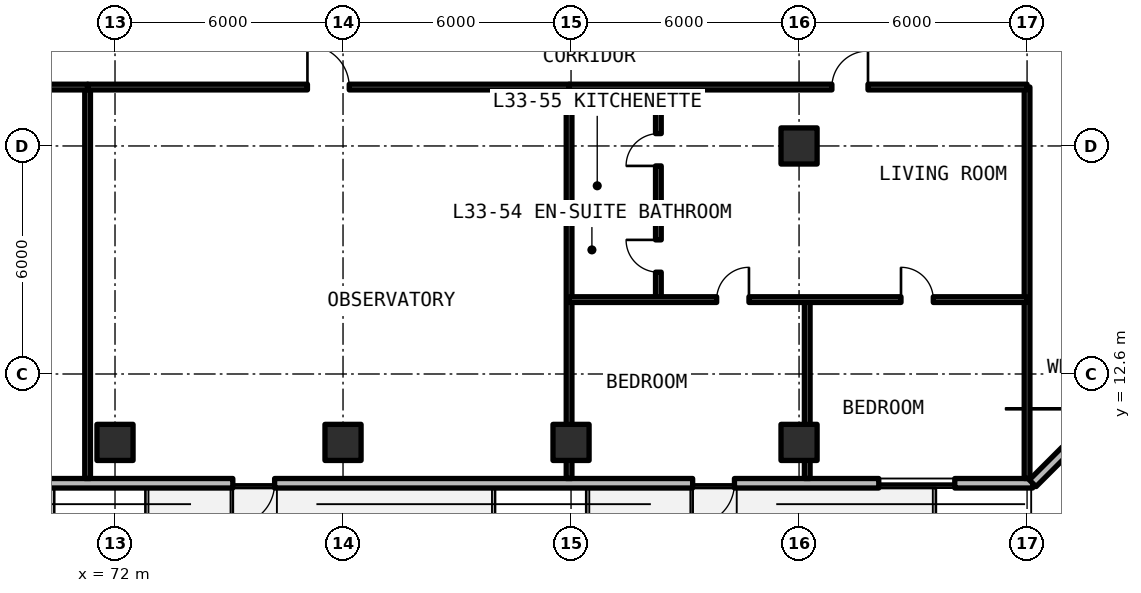
"""IFC4 building model, lengths in metres.
Left out: names, types, materials, properties, quantities, classifications, styles, units other than length and angle.
Written with IfcOpenShell. Run it as: python <this file> out.ifc"""

import sys

from ifc_helpers import new_model, si_unit, direction, frame, frame_2d, origin, origin_2d, place, context, subcontext, project, spatial, rectangle, extrude, element, fill, save


model = new_model("IFC4")
c1 = context("Model", 3, precision=1e-05, world=origin(), true_north=direction((0.0, 1.0)))
c2 = subcontext(c1, "Body", "Model", "MODEL_VIEW")
j1 = project(units=[si_unit("LENGTHUNIT", "METRE"), si_unit("PLANEANGLEUNIT", "RADIAN")], contexts=[c1])
p1 = place(None, origin())
s1 = spatial("IfcSite", under=j1, at=p1, CompositionType="ELEMENT")
p2 = place(p1, origin())
s2 = spatial("IfcBuilding", under=s1, at=p2, CompositionType="ELEMENT")
p3 = place(p2, frame((0.0, 0.0, 119.46)))
s3 = spatial("IfcBuildingStorey", under=s2, at=p3, CompositionType="ELEMENT", Elevation=119.46)
for number, where, z_axis, x_axis in (
    (1, (90.0, 18.6, 0.0), (0.0, 0.0, 1.0), (1.0, 0.0, 0.0)),
    (2, (72.0, 10.8, 0.0), (0.0, 0.0, 1.0), (1.0, 0.0, 0.0)),
    (3, (78.0, 10.8, 0.0), (0.0, 0.0, 1.0), (1.0, 0.0, 0.0)),
    (4, (84.0, 10.8, 0.0), (0.0, 0.0, 1.0), (1.0, 0.0, 0.0)),
    (5, (90.0, 10.8, 0.0), (0.0, 0.0, 1.0), (1.0, 0.0, 0.0)),
):
    element("IfcColumn", number, at=place(p3, frame(where, z_axis=z_axis, x_axis=x_axis)), inside=s3, PredefinedType="COLUMN", context=c2, shape_type="SweptSolid", body=[
        extrude(rectangle(XDim=0.95, YDim=0.95, at=origin_2d()), origin(), (0.0, 0.0, 1.0), 3.63),
    ])
p4 = place(p3, frame((52.125, 9.725, 0.0), z_axis=(0.0, 0.0, 1.0), x_axis=(1.0, 0.0, 0.0)))
e6 = element("IfcWall", 6, at=p4, inside=s3, PredefinedType="SOLIDWALL", context=c2, shape_type="SweptSolid", body=[
    extrude(rectangle(XDim=44.023, YDim=0.25, at=frame_2d((22.012, 0.0))), origin(), (0.0, 0.0, 1.0), 3.35),
])
p5 = place(p4, frame((10.875, 0.0, 0.0)))
e7 = element("IfcOpeningElement", 7, at=p5, cuts=e6, PredefinedType="OPENING", context=c2, shape_type="SweptSolid", body=[
    extrude(rectangle(XDim=1.1, YDim=2.15, at=frame_2d((0.55, 1.075))), frame((0.0, 0.135, 0.0), z_axis=(0.0, -1.0, 0.0), x_axis=(1.0, 0.0, 0.0)), (0.0, 0.0, 1.0), 0.27),
])
p6 = place(p4, frame((22.975, 0.0, 0.0)))
e8 = element("IfcOpeningElement", 8, at=p6, cuts=e6, PredefinedType="OPENING", context=c2, shape_type="SweptSolid", body=[
    extrude(rectangle(XDim=1.1, YDim=2.15, at=frame_2d((0.55, 1.075))), frame((0.0, 0.135, 0.0), z_axis=(0.0, -1.0, 0.0), x_axis=(1.0, 0.0, 0.0)), (0.0, 0.0, 1.0), 0.27),
])
p7 = place(p4, frame((35.075, 0.0, 0.0)))
e9 = element("IfcOpeningElement", 9, at=p7, cuts=e6, PredefinedType="OPENING", context=c2, shape_type="SweptSolid", body=[
    extrude(rectangle(XDim=1.1, YDim=2.15, at=frame_2d((0.55, 1.075))), frame((0.0, 0.135, 0.0), z_axis=(0.0, -1.0, 0.0), x_axis=(1.0, 0.0, 0.0)), (0.0, 0.0, 1.0), 0.27),
])
p8 = place(p4, frame((2.703, 0.0, 0.78)))
e10 = element("IfcOpeningElement", 10, at=p8, cuts=e6, PredefinedType="OPENING", context=c2, shape_type="SweptSolid", body=[
    extrude(rectangle(XDim=2.0, YDim=1.66, at=frame_2d((1.0, 0.83))), frame((0.0, 0.135, 0.0), z_axis=(0.0, -1.0, 0.0), x_axis=(1.0, 0.0, 0.0)), (0.0, 0.0, 1.0), 0.27),
])
p9 = place(p4, frame((39.973, 0.0, 0.78)))
e11 = element("IfcOpeningElement", 11, at=p9, cuts=e6, PredefinedType="OPENING", context=c2, shape_type="SweptSolid", body=[
    extrude(rectangle(XDim=2.0, YDim=1.66, at=frame_2d((1.0, 0.83))), frame((0.0, 0.135, 0.0), z_axis=(0.0, -1.0, 0.0), x_axis=(1.0, 0.0, 0.0)), (0.0, 0.0, 1.0), 0.27),
])
p10 = place(p3, frame((96.148, 9.725, 0.0), z_axis=(0.0, 0.0, 1.0), x_axis=(0.707106781187, 0.707106781187, 0.0)))
e12 = element("IfcWall", 12, at=p10, inside=s3, PredefinedType="SOLIDWALL", context=c2, shape_type="SweptSolid", body=[
    extrude(rectangle(XDim=5.836, YDim=0.25, at=frame_2d((2.918, 0.0))), origin(), (0.0, 0.0, 1.0), 3.35),
])
p11 = place(p10, frame((1.218, 0.0, 0.78)))
e13 = element("IfcOpeningElement", 13, at=p11, cuts=e12, PredefinedType="OPENING", context=c2, shape_type="SweptSolid", body=[
    extrude(rectangle(XDim=3.4, YDim=1.66, at=frame_2d((1.7, 0.83))), frame((0.0, 0.135, 0.0), z_axis=(0.0, -1.0, 0.0), x_axis=(1.0, 0.0, 0.0)), (0.0, 0.0, 1.0), 0.27),
])
for number, where, z_axis, x_axis in (
    (14, (96.0, 9.85, 0.0), (0.0, 0.0, 1.0), (0.0, 1.0, 0.0)),
    (15, (71.279, 9.85, 0.0), (0.0, 0.0, 1.0), (0.0, 1.0, 0.0)),
):
    element("IfcWall", number, at=place(p3, frame(where, z_axis=z_axis, x_axis=x_axis)), inside=s3, PredefinedType="SOLIDWALL", context=c2, shape_type="SweptSolid", body=[
        extrude(rectangle(XDim=10.3, YDim=0.15, at=frame_2d((5.15, 0.0))), origin(), (0.0, 0.0, 1.0), 2.57),
    ])
p12 = place(p3, frame((59.536, 20.15, 0.0), z_axis=(0.0, 0.0, 1.0), x_axis=(1.0, 0.0, 0.0)))
e16 = element("IfcWall", 16, at=p12, inside=s3, PredefinedType="SOLIDWALL", context=c2, shape_type="SweptSolid", body=[
    extrude(rectangle(XDim=11.742, YDim=0.15, at=frame_2d((5.871, 0.0))), origin(), (0.0, 0.0, 1.0), 2.57),
])
p13 = place(p12, frame((5.321, 0.0, 0.0)))
e17 = element("IfcOpeningElement", 17, at=p13, cuts=e16, PredefinedType="OPENING", context=c2, shape_type="SweptSolid", body=[
    extrude(rectangle(XDim=1.1, YDim=2.15, at=frame_2d((0.55, 1.075))), frame((0.0, 0.085, 0.0), z_axis=(0.0, -1.0, 0.0), x_axis=(1.0, 0.0, 0.0)), (0.0, 0.0, 1.0), 0.17),
])
p14 = place(p3, frame((83.948, 9.85, 0.0), z_axis=(0.0, 0.0, 1.0), x_axis=(0.0, 1.0, 0.0)))
e18 = element("IfcWall", 18, at=p14, inside=s3, PredefinedType="SOLIDWALL", context=c2, shape_type="SweptSolid", body=[
    extrude(rectangle(XDim=10.3, YDim=0.15, at=frame_2d((5.15, 0.0))), origin(), (0.0, 0.0, 1.0), 2.57),
])
p15 = place(p3, frame((71.279, 20.15, 0.0), z_axis=(0.0, 0.0, 1.0), x_axis=(1.0, 0.0, 0.0)))
e19 = element("IfcWall", 19, at=p15, inside=s3, PredefinedType="SOLIDWALL", context=c2, shape_type="SweptSolid", body=[
    extrude(rectangle(XDim=12.67, YDim=0.15, at=frame_2d((6.335, 0.0))), origin(), (0.0, 0.0, 1.0), 2.57),
])
p16 = place(p15, frame((5.785, 0.0, 0.0)))
e20 = element("IfcOpeningElement", 20, at=p16, cuts=e19, PredefinedType="OPENING", context=c2, shape_type="SweptSolid", body=[
    extrude(rectangle(XDim=1.1, YDim=2.15, at=frame_2d((0.55, 1.075))), frame((0.0, 0.085, 0.0), z_axis=(0.0, -1.0, 0.0), x_axis=(1.0, 0.0, 0.0)), (0.0, 0.0, 1.0), 0.17),
])
p17 = place(p3, frame((83.948, 16.85, 0.0), z_axis=(0.0, 0.0, 1.0), x_axis=(1.0, 0.0, 0.0)))
e21 = element("IfcWall", 21, at=p17, inside=s3, PredefinedType="PARTITIONING", context=c2, shape_type="SweptSolid", body=[
    extrude(rectangle(XDim=2.35, YDim=0.15, at=frame_2d((1.175, 0.0))), origin(), (0.0, 0.0, 1.0), 2.57),
])
p18 = place(p3, frame((86.298, 14.557, 0.0), z_axis=(0.0, 0.0, 1.0), x_axis=(0.0, 1.0, 0.0)))
e22 = element("IfcWall", 22, at=p18, inside=s3, PredefinedType="PARTITIONING", context=c2, shape_type="SweptSolid", body=[
    extrude(rectangle(XDim=5.593, YDim=0.15, at=frame_2d((2.796, 0.0))), origin(), (0.0, 0.0, 1.0), 2.57),
])
p19 = place(p18, frame((0.721, 0.0, 0.0)))
e23 = element("IfcOpeningElement", 23, at=p19, cuts=e22, PredefinedType="OPENING", context=c2, shape_type="SweptSolid", body=[
    extrude(rectangle(XDim=0.85, YDim=2.1, at=frame_2d((0.425, 1.05))), frame((0.0, 0.085, 0.0), z_axis=(0.0, -1.0, 0.0), x_axis=(1.0, 0.0, 0.0)), (0.0, 0.0, 1.0), 0.17),
])
p20 = place(p18, frame((3.518, 0.0, 0.0)))
e24 = element("IfcOpeningElement", 24, at=p20, cuts=e22, PredefinedType="OPENING", context=c2, shape_type="SweptSolid", body=[
    extrude(rectangle(XDim=0.85, YDim=2.1, at=frame_2d((0.425, 1.05))), frame((0.0, 0.085, 0.0), z_axis=(0.0, -1.0, 0.0), x_axis=(1.0, 0.0, 0.0)), (0.0, 0.0, 1.0), 0.17),
])
p21 = place(p3, frame((90.215, 9.85, 0.0), z_axis=(0.0, 0.0, 1.0), x_axis=(0.0, 1.0, 0.0)))
e25 = element("IfcWall", 25, at=p21, inside=s3, PredefinedType="PARTITIONING", context=c2, shape_type="SweptSolid", body=[
    extrude(rectangle(XDim=4.707, YDim=0.15, at=frame_2d((2.354, 0.0))), origin(), (0.0, 0.0, 1.0), 2.57),
])
p22 = place(p3, frame((83.948, 14.557, 0.0), z_axis=(0.0, 0.0, 1.0), x_axis=(1.0, 0.0, 0.0)))
e26 = element("IfcWall", 26, at=p22, inside=s3, PredefinedType="PARTITIONING", context=c2, shape_type="SweptSolid", body=[
    extrude(rectangle(XDim=12.052, YDim=0.15, at=frame_2d((6.026, 0.0))), origin(), (0.0, 0.0, 1.0), 2.57),
])
p23 = place(p22, frame((3.883, 0.0, 0.0)))
e27 = element("IfcOpeningElement", 27, at=p23, cuts=e26, PredefinedType="OPENING", context=c2, shape_type="SweptSolid", body=[
    extrude(rectangle(XDim=0.85, YDim=2.1, at=frame_2d((0.425, 1.05))), frame((0.0, 0.085, 0.0), z_axis=(0.0, -1.0, 0.0), x_axis=(1.0, 0.0, 0.0)), (0.0, 0.0, 1.0), 0.17),
])
p24 = place(p22, frame((8.734, 0.0, 0.0)))
e28 = element("IfcOpeningElement", 28, at=p24, cuts=e26, PredefinedType="OPENING", context=c2, shape_type="SweptSolid", body=[
    extrude(rectangle(XDim=0.85, YDim=2.1, at=frame_2d((0.425, 1.05))), frame((0.0, 0.085, 0.0), z_axis=(0.0, -1.0, 0.0), x_axis=(1.0, 0.0, 0.0)), (0.0, 0.0, 1.0), 0.17),
])
p25 = place(p3, frame((83.948, 20.15, 0.0), z_axis=(0.0, 0.0, 1.0), x_axis=(1.0, 0.0, 0.0)))
e29 = element("IfcWall", 29, at=p25, inside=s3, PredefinedType="SOLIDWALL", context=c2, shape_type="SweptSolid", body=[
    extrude(rectangle(XDim=12.052, YDim=0.15, at=frame_2d((6.026, 0.0))), origin(), (0.0, 0.0, 1.0), 2.57),
])
p26 = place(p25, frame((6.916, 0.0, 0.0)))
e30 = element("IfcOpeningElement", 30, at=p26, cuts=e29, PredefinedType="OPENING", context=c2, shape_type="SweptSolid", body=[
    extrude(rectangle(XDim=0.95, YDim=2.15, at=frame_2d((0.475, 1.075))), frame((0.0, 0.085, 0.0), z_axis=(0.0, -1.0, 0.0), x_axis=(1.0, 0.0, 0.0)), (0.0, 0.0, 1.0), 0.17),
])
p27 = place(p6, frame((1.1, 0.0, 0.0), z_axis=(0.0, 0.0, 1.0), x_axis=(-1.0, 0.0, 0.0)))
e31 = element("IfcDoor", 31, at=p27, inside=s3, OperationType="SINGLE_SWING_RIGHT", PredefinedType="DOOR", context=c2, shape_type="SweptSolid", body=[
    extrude(rectangle(XDim=1.1, YDim=2.15, at=frame_2d((0.55, 1.075))), frame((0.0, 0.025, 0.0), z_axis=(0.0, -1.0, 0.0), x_axis=(1.0, 0.0, 0.0)), (0.0, 0.0, 1.0), 0.05),
])
fill(e8, e31)
p28 = place(p7, frame((1.1, 0.0, 0.0), z_axis=(0.0, 0.0, 1.0), x_axis=(-1.0, 0.0, 0.0)))
e32 = element("IfcDoor", 32, at=p28, inside=s3, OperationType="SINGLE_SWING_LEFT", PredefinedType="DOOR", context=c2, shape_type="SweptSolid", body=[
    extrude(rectangle(XDim=1.1, YDim=2.15, at=frame_2d((0.55, 1.075))), frame((0.0, 0.025, 0.0), z_axis=(0.0, -1.0, 0.0), x_axis=(1.0, 0.0, 0.0)), (0.0, 0.0, 1.0), 0.05),
])
fill(e9, e32)
p29 = place(p9, origin())
e33 = element("IfcWindow", 33, at=p29, inside=s3, PartitioningType="SINGLE_PANEL", PredefinedType="WINDOW", context=c2, shape_type="SweptSolid", body=[
    extrude(rectangle(XDim=2.0, YDim=1.66, at=frame_2d((1.0, 0.83))), frame((0.0, 0.03, 0.0), z_axis=(0.0, -1.0, 0.0), x_axis=(1.0, 0.0, 0.0)), (0.0, 0.0, 1.0), 0.06),
])
fill(e11, e33)
p30 = place(p16, origin())
e34 = element("IfcDoor", 34, at=p30, inside=s3, OperationType="SINGLE_SWING_LEFT", PredefinedType="DOOR", context=c2, shape_type="SweptSolid", body=[
    extrude(rectangle(XDim=1.1, YDim=2.15, at=frame_2d((0.55, 1.075))), frame((0.0, 0.025, 0.0), z_axis=(0.0, -1.0, 0.0), x_axis=(1.0, 0.0, 0.0)), (0.0, 0.0, 1.0), 0.05),
])
fill(e20, e34)
p31 = place(p19, origin())
e35 = element("IfcDoor", 35, at=p31, inside=s3, OperationType="SINGLE_SWING_RIGHT", PredefinedType="DOOR", context=c2, shape_type="SweptSolid", body=[
    extrude(rectangle(XDim=0.85, YDim=2.1, at=frame_2d((0.425, 1.05))), frame((0.0, 0.025, 0.0), z_axis=(0.0, -1.0, 0.0), x_axis=(1.0, 0.0, 0.0)), (0.0, 0.0, 1.0), 0.05),
])
fill(e23, e35)
p32 = place(p20, origin())
e36 = element("IfcDoor", 36, at=p32, inside=s3, OperationType="SINGLE_SWING_LEFT", PredefinedType="DOOR", context=c2, shape_type="SweptSolid", body=[
    extrude(rectangle(XDim=0.85, YDim=2.1, at=frame_2d((0.425, 1.05))), frame((0.0, 0.025, 0.0), z_axis=(0.0, -1.0, 0.0), x_axis=(1.0, 0.0, 0.0)), (0.0, 0.0, 1.0), 0.05),
])
fill(e24, e36)
p33 = place(p23, origin())
e37 = element("IfcDoor", 37, at=p33, inside=s3, OperationType="SINGLE_SWING_RIGHT", PredefinedType="DOOR", context=c2, shape_type="SweptSolid", body=[
    extrude(rectangle(XDim=0.85, YDim=2.1, at=frame_2d((0.425, 1.05))), frame((0.0, 0.025, 0.0), z_axis=(0.0, -1.0, 0.0), x_axis=(1.0, 0.0, 0.0)), (0.0, 0.0, 1.0), 0.05),
])
fill(e27, e37)
p34 = place(p24, origin())
e38 = element("IfcDoor", 38, at=p34, inside=s3, OperationType="SINGLE_SWING_LEFT", PredefinedType="DOOR", context=c2, shape_type="SweptSolid", body=[
    extrude(rectangle(XDim=0.85, YDim=2.1, at=frame_2d((0.425, 1.05))), frame((0.0, 0.025, 0.0), z_axis=(0.0, -1.0, 0.0), x_axis=(1.0, 0.0, 0.0)), (0.0, 0.0, 1.0), 0.05),
])
fill(e28, e38)
p35 = place(p26, origin())
e39 = element("IfcDoor", 39, at=p35, inside=s3, OperationType="SINGLE_SWING_RIGHT", PredefinedType="DOOR", context=c2, shape_type="SweptSolid", body=[
    extrude(rectangle(XDim=0.95, YDim=2.15, at=frame_2d((0.475, 1.075))), frame((0.0, 0.025, 0.0), z_axis=(0.0, -1.0, 0.0), x_axis=(1.0, 0.0, 0.0)), (0.0, 0.0, 1.0), 0.05),
])
fill(e30, e39)
save(model, sys.argv[1])
